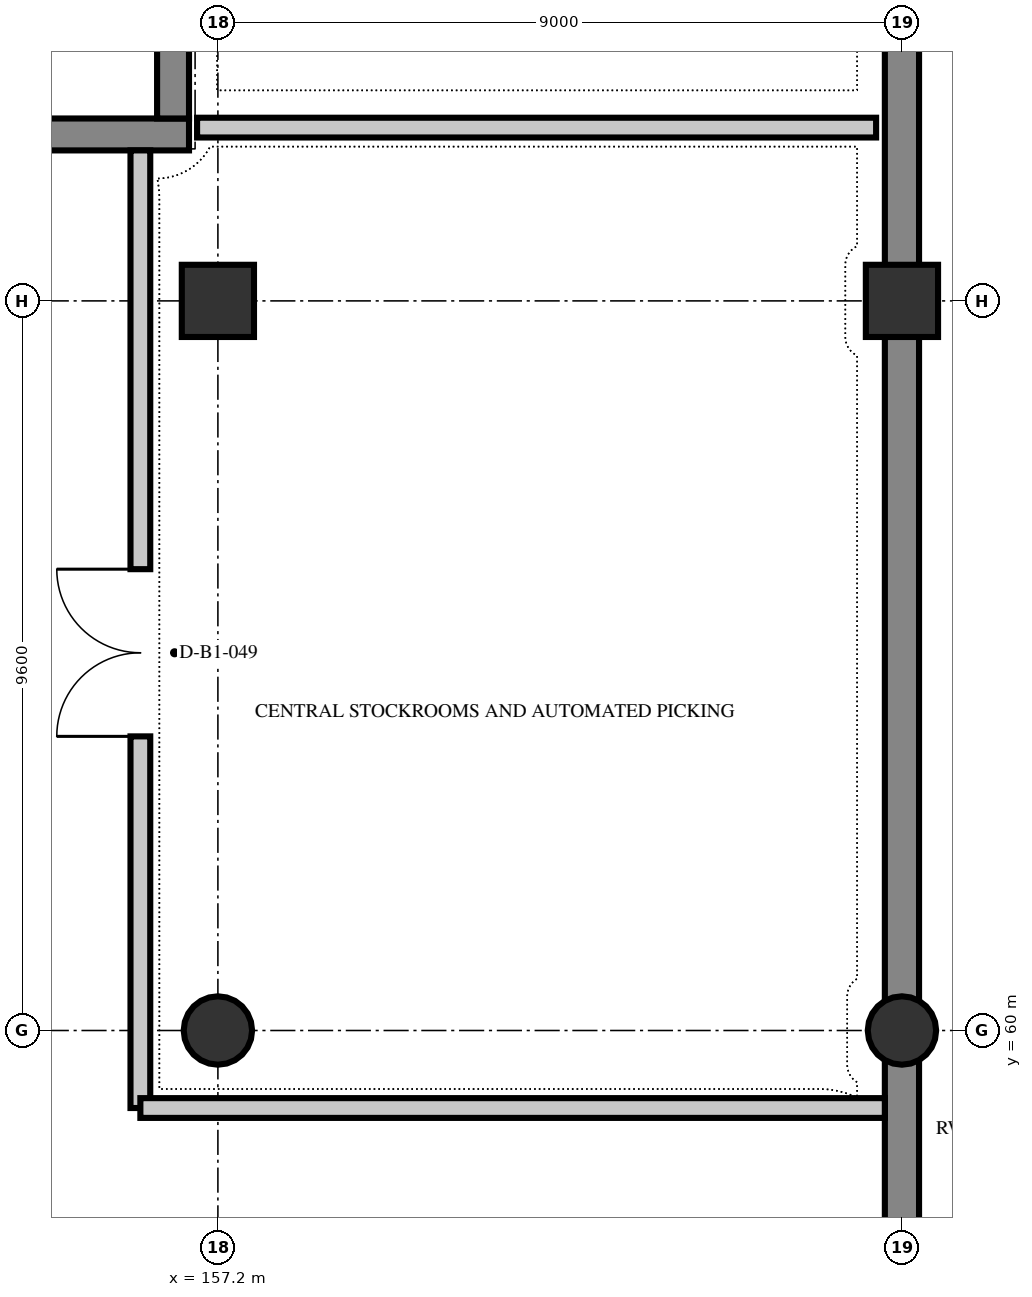
"""IFC4 building model, lengths in metres.
Left out: names, types, materials, properties, quantities, classifications, styles, units other than length and angle.
Written with IfcOpenShell. Run it as: python <this file> out.ifc"""

import sys

from ifc_helpers import new_model, si_unit, direction, frame, frame_2d, origin, origin_2d, place, context, subcontext, project, spatial, rectangle, circle, extrude, element, fill, save


model = new_model("IFC4")
c1 = context("Model", 3, precision=1e-05, world=origin(), true_north=direction((0.0, 1.0)))
c2 = subcontext(c1, "Body", "Model", "MODEL_VIEW")
j1 = project(units=[si_unit("LENGTHUNIT", "METRE"), si_unit("PLANEANGLEUNIT", "RADIAN")], contexts=[c1])
p1 = place(None, origin())
s1 = spatial("IfcSite", under=j1, at=p1, CompositionType="ELEMENT")
p2 = place(p1, origin())
s2 = spatial("IfcBuilding", under=s1, at=p2, CompositionType="ELEMENT")
p3 = place(p2, frame((0.0, 0.0, -4.8)))
s3 = spatial("IfcBuildingStorey", under=s2, at=p3, CompositionType="ELEMENT", Elevation=-4.8)
p4 = place(p3, frame((157.2, 60.0, 0.0), z_axis=(0.0, 0.0, 1.0), x_axis=(1.0, 0.0, 0.0)))
e1 = element("IfcColumn", 1, at=p4, inside=s3, PredefinedType="COLUMN", context=c2, shape_type="SweptSolid", body=[
    extrude(circle(Radius=0.45, at=origin_2d()), origin(), (0.0, 0.0, 1.0), 4.8),
])
p5 = place(p3, frame((157.2, 69.6, 0.0), z_axis=(0.0, 0.0, 1.0), x_axis=(1.0, 0.0, 0.0)))
e2 = element("IfcColumn", 2, at=p5, inside=s3, PredefinedType="COLUMN", context=c2, shape_type="SweptSolid", body=[
    extrude(rectangle(XDim=0.95, YDim=0.95, at=origin_2d()), origin(), (0.0, 0.0, 1.0), 4.8),
])
p6 = place(p3, frame((166.2, 60.0, 0.0), z_axis=(0.0, 0.0, 1.0), x_axis=(1.0, 0.0, 0.0)))
e3 = element("IfcColumn", 3, at=p6, inside=s3, PredefinedType="COLUMN", context=c2, shape_type="SweptSolid", body=[
    extrude(circle(Radius=0.45, at=origin_2d()), origin(), (0.0, 0.0, 1.0), 4.8),
])
p7 = place(p3, frame((166.2, 69.6, 0.0), z_axis=(0.0, 0.0, 1.0), x_axis=(1.0, 0.0, 0.0)))
e4 = element("IfcColumn", 4, at=p7, inside=s3, PredefinedType="COLUMN", context=c2, shape_type="SweptSolid", body=[
    extrude(rectangle(XDim=0.95, YDim=0.95, at=origin_2d()), origin(), (0.0, 0.0, 1.0), 4.8),
])
p8 = place(p3, frame((166.2, 98.5, 0.0), z_axis=(0.0, 0.0, 1.0), x_axis=(0.0, -1.0, 0.0)))
e5 = element("IfcWall", 5, at=p8, inside=s3, PredefinedType="USERDEFINED", context=c2, shape_type="SweptSolid", body=[
    extrude(rectangle(XDim=60.1, YDim=0.45, at=frame_2d((30.05, 0.0))), origin(), (0.0, 0.0, 1.0), 4.5),
])
p9 = place(p3, frame((151.88, 71.79, 0.0), z_axis=(0.0, 0.0, 1.0), x_axis=(1.0, 0.0, 0.0)))
e6 = element("IfcWall", 6, at=p9, inside=s3, PredefinedType="SHEAR", context=c2, shape_type="SweptSolid", body=[
    extrude(rectangle(XDim=4.94, YDim=0.42, at=frame_2d((2.47, 0.0))), origin(), (0.0, 0.0, 1.0), 4.5),
])
p10 = place(p3, frame((156.61, 72.0, 0.0), z_axis=(0.0, 0.0, 1.0), x_axis=(0.0, 1.0, 0.0)))
e7 = element("IfcWall", 7, at=p10, inside=s3, PredefinedType="SHEAR", context=c2, shape_type="SweptSolid", body=[
    extrude(rectangle(XDim=8.8, YDim=0.42, at=frame_2d((4.4, 0.0))), origin(), (0.0, 0.0, 1.0), 4.5),
])
p11 = place(p3, frame((156.18, 58.98, 0.0), z_axis=(0.0, 0.0, 1.0), x_axis=(0.0, 1.0, 0.0)))
e8 = element("IfcWall", 8, at=p11, inside=s3, PredefinedType="PARTITIONING", context=c2, shape_type="SweptSolid", body=[
    extrude(rectangle(XDim=12.6, YDim=0.26, at=frame_2d((6.3, 0.0))), origin(), (0.0, 0.0, 1.0), 3.44),
])
p12 = place(p11, frame((4.89, 0.0, 0.0)))
e9 = element("IfcOpeningElement", 9, at=p12, cuts=e8, PredefinedType="OPENING", context=c2, shape_type="SweptSolid", body=[
    extrude(rectangle(XDim=2.2, YDim=2.5, at=frame_2d((1.1, 1.25))), frame((0.0, 0.142, 0.0), z_axis=(0.0, -1.0, 0.0), x_axis=(1.0, 0.0, 0.0)), (0.0, 0.0, 1.0), 0.284),
])
p13 = place(p3, frame((165.975, 58.98, 0.0), z_axis=(0.0, 0.0, 1.0), x_axis=(-1.0, 0.0, 0.0)))
e10 = element("IfcWall", 10, at=p13, inside=s3, PredefinedType="PARTITIONING", context=c2, shape_type="SweptSolid", body=[
    extrude(rectangle(XDim=9.795, YDim=0.26, at=frame_2d((4.897, 0.0))), origin(), (0.0, 0.0, 1.0), 4.5),
])
p14 = place(p3, frame((156.926, 71.88, 0.0), z_axis=(0.0, 0.0, 1.0), x_axis=(1.0, 0.0, 0.0)))
e11 = element("IfcWall", 11, at=p14, inside=s3, PredefinedType="PARTITIONING", context=c2, shape_type="SweptSolid", body=[
    extrude(rectangle(XDim=8.934, YDim=0.26, at=frame_2d((4.467, 0.0))), origin(), (0.0, 0.0, 1.0), 3.44),
])
p15 = place(p12, origin())
e12 = element("IfcDoor", 12, at=p15, inside=s3, OperationType="DOUBLE_DOOR_SINGLE_SWING", PredefinedType="DOOR", context=c2, shape_type="SweptSolid", body=[
    extrude(rectangle(XDim=2.2, YDim=2.5, at=frame_2d((1.1, 1.25))), frame((0.0, 0.025, 0.0), z_axis=(0.0, -1.0, 0.0), x_axis=(1.0, 0.0, 0.0)), (0.0, 0.0, 1.0), 0.05),
])
fill(e9, e12)
save(model, sys.argv[1])
